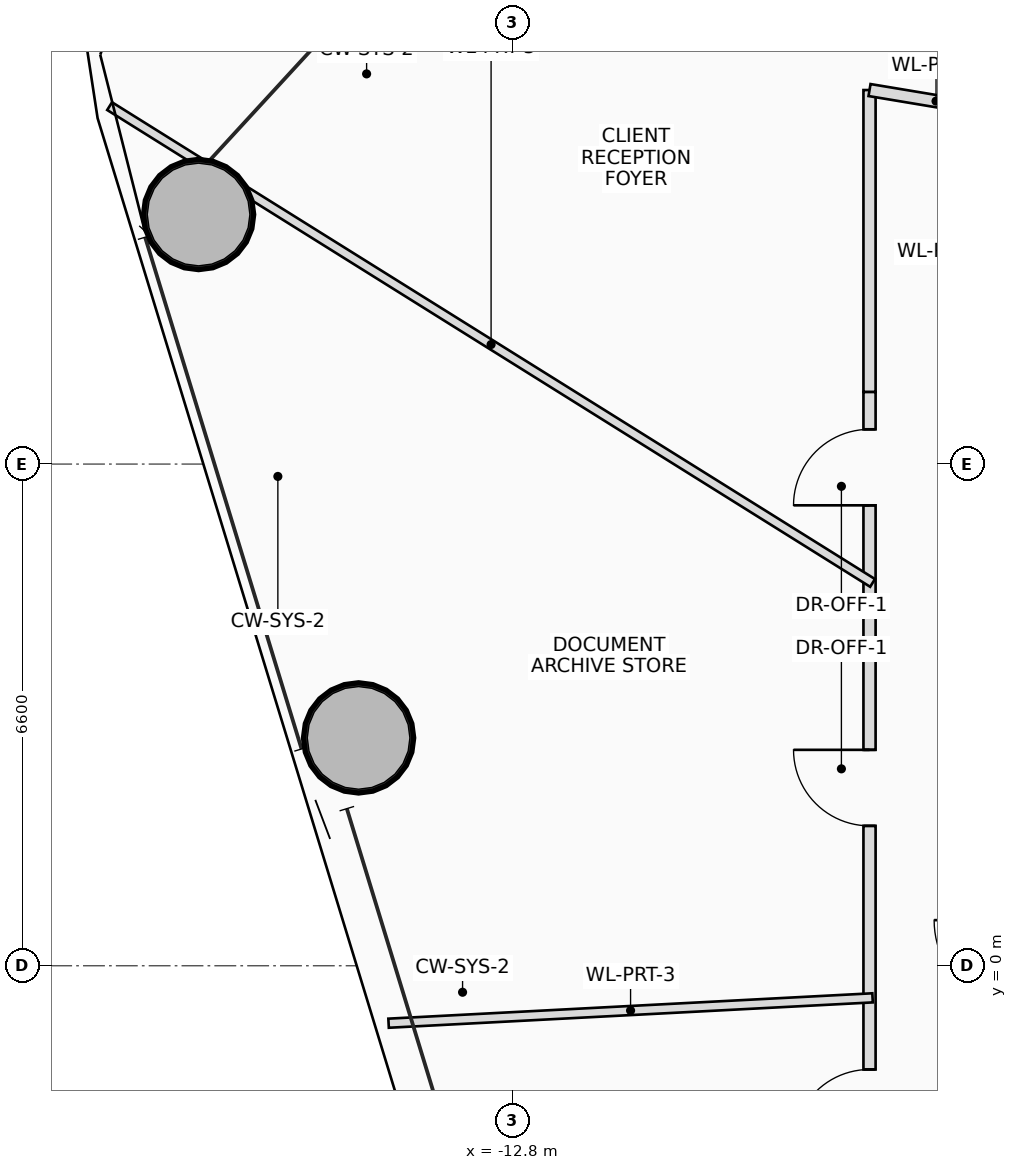
"""IFC4 building model, lengths in metres.
Left out: names, types, materials, properties, quantities, classifications, styles, units other than length and angle.
Written with IfcOpenShell. Run it as: python <this file> out.ifc"""

import sys

from ifc_helpers import new_model, si_unit, direction, frame, frame_2d, origin, origin_2d, place, context, subcontext, project, spatial, rectangle, hollow_circle, extrude, source, transform, mapped, element, fill, save


model = new_model("IFC4")
c1 = context("Model", 3, precision=1e-05, world=origin(), true_north=direction((0.0, 1.0)))
c2 = subcontext(c1, "Body", "Model", "MODEL_VIEW")
j1 = project(units=[si_unit("LENGTHUNIT", "METRE"), si_unit("PLANEANGLEUNIT", "RADIAN")], contexts=[c1])
p1 = place(None, origin())
s1 = spatial("IfcSite", under=j1, at=p1, CompositionType="ELEMENT")
p2 = place(p1, origin())
s2 = spatial("IfcBuilding", under=s1, at=p2, CompositionType="ELEMENT")
p3 = place(p2, frame((0.0, 0.0, 104.9)))
s3 = spatial("IfcBuildingStorey", under=s2, at=p3, CompositionType="ELEMENT", Elevation=104.9)
m1 = source(origin(), c2, "Body", "SweptSolid", [
    extrude(hollow_circle(Radius=0.725, WallThickness=0.05, at=origin_2d()), origin(), (0.0, 0.0, 1.0), 3.75),
])
for number, where, z_axis, x_axis in (
    (1, (-16.927, 9.883, 0.0), (0.0, 0.0, 1.0), (1.0, 0.0, 0.0)),
    (2, (-14.823, 2.998, 0.0), (0.0, 0.0, 1.0), (1.0, 0.0, 0.0)),
):
    element("IfcColumn", number, at=place(p3, frame(where, z_axis=z_axis, x_axis=x_axis)), inside=s3, PredefinedType="COLUMN", context=c2, shape_type="MappedRepresentation", body=[
        mapped(m1, transform((0.0, 0.0, 0.0), scale=1.0)),
    ])
p4 = place(p3, frame((-8.1, -7.55, 0.0), z_axis=(0.0, 0.0, 1.0), x_axis=(0.0, 1.0, 0.0)))
e3 = element("IfcWall", 3, at=p4, inside=s3, PredefinedType="PARTITIONING", context=c2, shape_type="SweptSolid", body=[
    extrude(rectangle(XDim=15.1, YDim=0.16, at=frame_2d((7.55, 0.0))), origin(), (0.0, 0.0, 1.0), 2.85),
])
p5 = place(p4, frame((5.185, 0.0, 0.0)))
e4 = element("IfcOpeningElement", 4, at=p5, cuts=e3, PredefinedType="OPENING", context=c2, shape_type="SweptSolid", body=[
    extrude(rectangle(XDim=1.0, YDim=2.25, at=frame_2d((0.5, 1.125))), frame((0.0, 0.09, 0.0), z_axis=(0.0, -1.0, 0.0), x_axis=(1.0, 0.0, 0.0)), (0.0, 0.0, 1.0), 0.18),
])
p6 = place(p4, frame((9.39, 0.0, 0.0)))
e5 = element("IfcOpeningElement", 5, at=p6, cuts=e3, PredefinedType="OPENING", context=c2, shape_type="SweptSolid", body=[
    extrude(rectangle(XDim=1.0, YDim=2.25, at=frame_2d((0.5, 1.125))), frame((0.0, 0.09, 0.0), z_axis=(0.0, -1.0, 0.0), x_axis=(1.0, 0.0, 0.0)), (0.0, 0.0, 1.0), 0.18),
])
p7 = place(p4, frame((13.607, 0.0, 0.0)))
e6 = element("IfcOpeningElement", 6, at=p7, cuts=e3, PredefinedType="OPENING", context=c2, shape_type="SweptSolid", body=[
    extrude(rectangle(XDim=1.0, YDim=2.25, at=frame_2d((0.5, 1.125))), frame((0.0, 0.09, 0.0), z_axis=(0.0, -1.0, 0.0), x_axis=(1.0, 0.0, 0.0)), (0.0, 0.0, 1.0), 0.18),
])
p8 = place(p3, frame((-8.1, 7.55, 0.0), z_axis=(0.0, 0.0, 1.0), x_axis=(0.0, 1.0, 0.0)))
e7 = element("IfcWall", 7, at=p8, inside=s3, PredefinedType="PARTITIONING", context=c2, shape_type="SweptSolid", body=[
    extrude(rectangle(XDim=3.971, YDim=0.16, at=frame_2d((1.985, 0.0))), origin(), (0.0, 0.0, 1.0), 2.85),
])
p9 = place(p3, frame((-8.1, 11.521, 0.0), z_axis=(0.0, 0.0, 1.0), x_axis=(0.986408796856, -0.164309724253, 0.0)))
e8 = element("IfcWall", 8, at=p9, inside=s3, PredefinedType="PARTITIONING", context=c2, shape_type="SweptSolid", body=[
    extrude(rectangle(XDim=1.774, YDim=0.16, at=frame_2d((0.887, 0.0))), origin(), (0.0, 0.0, 1.0), 3.545),
])
p10 = place(p3, frame((-8.06, -0.422, 0.0), z_axis=(0.0, 0.0, 1.0), x_axis=(-0.998629334036, -0.052339786045, 0.0)))
e9 = element("IfcWall", 9, at=p10, inside=s3, PredefinedType="PARTITIONING", context=c2, shape_type="SweptSolid", body=[
    extrude(rectangle(XDim=6.376, YDim=0.12, at=frame_2d((3.188, 0.0))), origin(), (0.0, 0.0, 1.0), 3.01),
])
p11 = place(p3, frame((-8.06, 5.036, 0.0), z_axis=(0.0, 0.0, 1.0), x_axis=(-0.848040015969, 0.529932195016, 0.0)))
e10 = element("IfcWall", 10, at=p11, inside=s3, PredefinedType="PARTITIONING", context=c2, shape_type="SweptSolid", body=[
    extrude(rectangle(XDim=11.837, YDim=0.12, at=frame_2d((5.918, 0.0))), origin(), (0.0, 0.0, 1.0), 2.85),
])
p12 = place(p5, origin())
e11 = element("IfcDoor", 11, at=p12, inside=s3, OperationType="SINGLE_SWING_LEFT", PredefinedType="DOOR", context=c2, shape_type="SweptSolid", body=[
    extrude(rectangle(XDim=1.0, YDim=2.25, at=frame_2d((0.5, 1.125))), frame((0.0, 0.025, 0.0), z_axis=(0.0, -1.0, 0.0), x_axis=(1.0, 0.0, 0.0)), (0.0, 0.0, 1.0), 0.05),
])
fill(e4, e11)
p13 = place(p6, origin())
e12 = element("IfcDoor", 12, at=p13, inside=s3, OperationType="SINGLE_SWING_RIGHT", PredefinedType="DOOR", context=c2, shape_type="SweptSolid", body=[
    extrude(rectangle(XDim=1.0, YDim=2.25, at=frame_2d((0.5, 1.125))), frame((0.0, 0.025, 0.0), z_axis=(0.0, -1.0, 0.0), x_axis=(1.0, 0.0, 0.0)), (0.0, 0.0, 1.0), 0.05),
])
fill(e5, e12)
p14 = place(p7, origin())
e13 = element("IfcDoor", 13, at=p14, inside=s3, OperationType="SINGLE_SWING_LEFT", PredefinedType="DOOR", context=c2, shape_type="SweptSolid", body=[
    extrude(rectangle(XDim=1.0, YDim=2.25, at=frame_2d((0.5, 1.125))), frame((0.0, 0.025, 0.0), z_axis=(0.0, -1.0, 0.0), x_axis=(1.0, 0.0, 0.0)), (0.0, 0.0, 1.0), 0.05),
])
fill(e6, e13)
save(model, sys.argv[1])
